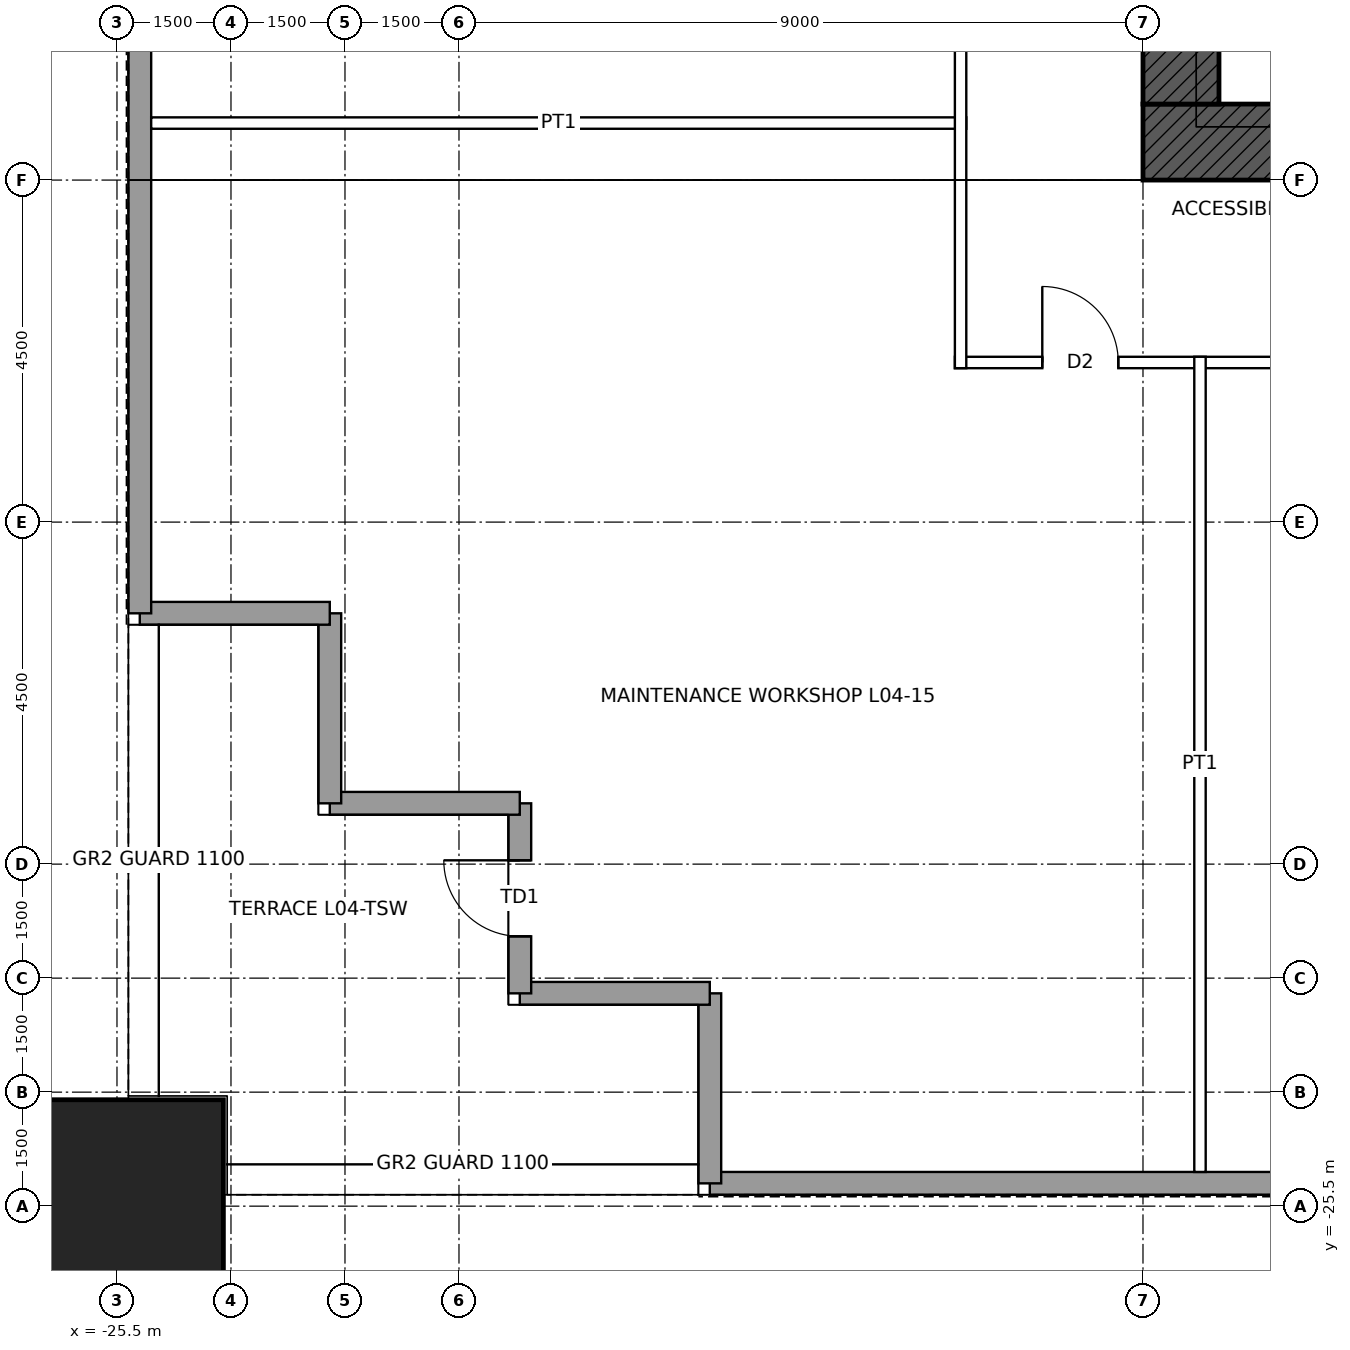
"""IFC4 building model, lengths in metres.
Left out: names, types, materials, properties, quantities, classifications, styles, units other than length and angle.
Written with IfcOpenShell. Run it as: python <this file> out.ifc"""

import sys

from ifc_helpers import new_model, si_unit, direction, frame, frame_2d, origin, origin_2d, place, context, subcontext, project, spatial, rectangle, hollow_rectangle, extrude, element, fill, save


model = new_model("IFC4")
c1 = context("Model", 3, precision=1e-05, world=origin(), true_north=direction((0.0, 1.0)))
c2 = subcontext(c1, "Body", "Model", "MODEL_VIEW")
j1 = project(units=[si_unit("LENGTHUNIT", "METRE"), si_unit("PLANEANGLEUNIT", "RADIAN")], contexts=[c1])
p1 = place(None, origin())
s1 = spatial("IfcSite", under=j1, at=p1, CompositionType="ELEMENT")
p2 = place(p1, origin())
s2 = spatial("IfcBuilding", under=s1, at=p2, CompositionType="ELEMENT")
p3 = place(p2, frame((0.0, 0.0, 23.4)))
s3 = spatial("IfcBuildingStorey", under=s2, at=p3, CompositionType="ELEMENT", Elevation=23.4)
p4 = place(p3, frame((-25.5, -25.5, 0.0), z_axis=(0.0, 0.0, 1.0), x_axis=(1.0, 0.0, 0.0)))
e1 = element("IfcColumn", 1, at=p4, inside=s3, PredefinedType="COLUMN", context=c2, shape_type="SweptSolid", body=[
    extrude(hollow_rectangle(XDim=2.8, YDim=2.8, WallThickness=0.14, at=origin_2d()), origin(), (0.0, 0.0, 1.0), 5.0),
])
p5 = place(p3, frame((12.0, -11.5, 0.0), z_axis=(0.0, 0.0, 1.0), x_axis=(-1.0, 0.0, 0.0)))
e2 = element("IfcWall", 2, at=p5, inside=s3, PredefinedType="SHEAR", context=c2, shape_type="SweptSolid", body=[
    extrude(rectangle(XDim=24.0, YDim=1.0, at=frame_2d((12.0, 0.0))), origin(), (0.0, 0.0, 1.0), 5.0),
])
p6 = place(p5, frame((11.5, 0.0, 0.0)))
e3 = element("IfcOpeningElement", 3, at=p6, cuts=e2, PredefinedType="OPENING", context=c2, shape_type="SweptSolid", body=[
    extrude(rectangle(XDim=1.0, YDim=2.1, at=frame_2d((0.5, 1.05))), frame((0.0, 0.51, 0.0), z_axis=(0.0, -1.0, 0.0), x_axis=(1.0, 0.0, 0.0)), (0.0, 0.0, 1.0), 1.02),
])
p7 = place(p5, frame((1.0, 0.0, 0.0)))
e4 = element("IfcOpeningElement", 4, at=p7, cuts=e2, PredefinedType="OPENING", context=c2, shape_type="SweptSolid", body=[
    extrude(rectangle(XDim=1.0, YDim=2.4, at=frame_2d((0.5, 1.2))), frame((0.0, 0.51, 0.0), z_axis=(0.0, -1.0, 0.0), x_axis=(1.0, 0.0, 0.0)), (0.0, 0.0, 1.0), 1.02),
])
p8 = place(p3, frame((-11.5, -11.0, 0.0), z_axis=(0.0, 0.0, 1.0), x_axis=(0.0, 1.0, 0.0)))
e5 = element("IfcWall", 5, at=p8, inside=s3, PredefinedType="SHEAR", context=c2, shape_type="SweptSolid", body=[
    extrude(rectangle(XDim=22.0, YDim=1.0, at=frame_2d((11.0, 0.0))), origin(), (0.0, 0.0, 1.0), 5.0),
])
p9 = place(p8, frame((10.5, 0.0, 0.0)))
e6 = element("IfcOpeningElement", 6, at=p9, cuts=e5, PredefinedType="OPENING", context=c2, shape_type="SweptSolid", body=[
    extrude(rectangle(XDim=1.0, YDim=2.4, at=frame_2d((0.5, 1.2))), frame((0.0, 0.51, 0.0), z_axis=(0.0, -1.0, 0.0), x_axis=(1.0, 0.0, 0.0)), (0.0, 0.0, 1.0), 1.02),
])
p10 = place(p3, frame((17.7, -25.2, 0.0), z_axis=(0.0, 0.0, 1.0), x_axis=(-1.0, 0.0, 0.0)))
e7 = element("IfcWall", 7, at=p10, inside=s3, PredefinedType="SOLIDWALL", context=c2, shape_type="SweptSolid", body=[
    extrude(rectangle(XDim=35.4, YDim=0.3, at=frame_2d((17.7, 0.0))), origin(), (0.0, 0.0, 1.0), 4.8),
])
for number, where, z_axis, x_axis in (
    (8, (-17.7, -25.2, 0.0), (0.0, 0.0, 1.0), (0.0, 1.0, 0.0)),
    (9, (-17.7, -22.7, 0.0), (0.0, 0.0, 1.0), (-1.0, 0.0, 0.0)),
):
    element("IfcWall", number, at=place(p3, frame(where, z_axis=z_axis, x_axis=x_axis)), inside=s3, PredefinedType="SOLIDWALL", context=c2, shape_type="SweptSolid", body=[
        extrude(rectangle(XDim=2.5, YDim=0.3, at=frame_2d((1.25, 0.0))), origin(), (0.0, 0.0, 1.0), 4.8),
    ])
p11 = place(p3, frame((-20.2, -22.7, 0.0), z_axis=(0.0, 0.0, 1.0), x_axis=(0.0, 1.0, 0.0)))
e10 = element("IfcWall", 10, at=p11, inside=s3, PredefinedType="SOLIDWALL", context=c2, shape_type="SweptSolid", body=[
    extrude(rectangle(XDim=2.5, YDim=0.3, at=frame_2d((1.25, 0.0))), origin(), (0.0, 0.0, 1.0), 4.8),
])
p12 = place(p11, frame((0.75, 0.0, 0.0)))
e11 = element("IfcOpeningElement", 11, at=p12, cuts=e10, PredefinedType="OPENING", context=c2, shape_type="SweptSolid", body=[
    extrude(rectangle(XDim=1.0, YDim=2.4, at=frame_2d((0.5, 1.2))), frame((0.0, 0.16, 0.0), z_axis=(0.0, -1.0, 0.0), x_axis=(1.0, 0.0, 0.0)), (0.0, 0.0, 1.0), 0.32),
])
for number, where, z_axis, x_axis in (
    (12, (-20.2, -20.2, 0.0), (0.0, 0.0, 1.0), (-1.0, 0.0, 0.0)),
    (13, (-22.7, -20.2, 0.0), (0.0, 0.0, 1.0), (0.0, 1.0, 0.0)),
    (14, (-22.7, -17.7, 0.0), (0.0, 0.0, 1.0), (-1.0, 0.0, 0.0)),
):
    element("IfcWall", number, at=place(p3, frame(where, z_axis=z_axis, x_axis=x_axis)), inside=s3, PredefinedType="SOLIDWALL", context=c2, shape_type="SweptSolid", body=[
        extrude(rectangle(XDim=2.5, YDim=0.3, at=frame_2d((1.25, 0.0))), origin(), (0.0, 0.0, 1.0), 4.8),
    ])
p13 = place(p3, frame((-25.2, -17.7, 0.0), z_axis=(0.0, 0.0, 1.0), x_axis=(0.0, 1.0, 0.0)))
e15 = element("IfcWall", 15, at=p13, inside=s3, PredefinedType="SOLIDWALL", context=c2, shape_type="SweptSolid", body=[
    extrude(rectangle(XDim=35.4, YDim=0.3, at=frame_2d((17.7, 0.0))), origin(), (0.0, 0.0, 1.0), 4.8),
])
p14 = place(p13, frame((13.45, 0.0, 0.0)))
e16 = element("IfcOpeningElement", 16, at=p14, cuts=e15, PredefinedType="OPENING", context=c2, shape_type="SweptSolid", body=[
    extrude(rectangle(XDim=1.0, YDim=2.1, at=frame_2d((0.5, 1.05))), frame((0.0, 0.16, 0.0), z_axis=(0.0, -1.0, 0.0), x_axis=(1.0, 0.0, 0.0)), (0.0, 0.0, 1.0), 0.32),
])
p15 = place(p3, frame((-14.475, -14.4, 0.0), z_axis=(0.0, 0.0, 1.0), x_axis=(1.0, 0.0, 0.0)))
e17 = element("IfcWall", 17, at=p15, inside=s3, PredefinedType="PARTITIONING", context=c2, shape_type="SweptSolid", body=[
    extrude(rectangle(XDim=28.95, YDim=0.15, at=frame_2d((14.475, 0.0))), origin(), (0.0, 0.0, 1.0), 4.8),
])
p16 = place(p15, frame((19.2, 0.0, 0.0)))
e18 = element("IfcOpeningElement", 18, at=p16, cuts=e17, PredefinedType="OPENING", context=c2, shape_type="SweptSolid", body=[
    extrude(rectangle(XDim=1.8, YDim=2.4, at=frame_2d((0.9, 1.2))), frame((0.0, 0.085, 0.0), z_axis=(0.0, -1.0, 0.0), x_axis=(1.0, 0.0, 0.0)), (0.0, 0.0, 1.0), 0.17),
])
p17 = place(p15, frame((11.7, 0.0, 0.0)))
e19 = element("IfcOpeningElement", 19, at=p17, cuts=e17, PredefinedType="OPENING", context=c2, shape_type="SweptSolid", body=[
    extrude(rectangle(XDim=1.8, YDim=2.4, at=frame_2d((0.9, 1.2))), frame((0.0, 0.085, 0.0), z_axis=(0.0, -1.0, 0.0), x_axis=(1.0, 0.0, 0.0)), (0.0, 0.0, 1.0), 0.17),
])
p18 = place(p15, frame((6.475, 0.0, 0.0)))
e20 = element("IfcOpeningElement", 20, at=p18, cuts=e17, PredefinedType="OPENING", context=c2, shape_type="SweptSolid", body=[
    extrude(rectangle(XDim=1.0, YDim=2.1, at=frame_2d((0.5, 1.05))), frame((0.0, 0.085, 0.0), z_axis=(0.0, -1.0, 0.0), x_axis=(1.0, 0.0, 0.0)), (0.0, 0.0, 1.0), 0.17),
])
p19 = place(p15, frame((26.8, 0.0, 0.0)))
e21 = element("IfcOpeningElement", 21, at=p19, cuts=e17, PredefinedType="OPENING", context=c2, shape_type="SweptSolid", body=[
    extrude(rectangle(XDim=1.0, YDim=2.1, at=frame_2d((0.5, 1.05))), frame((0.0, 0.085, 0.0), z_axis=(0.0, -1.0, 0.0), x_axis=(1.0, 0.0, 0.0)), (0.0, 0.0, 1.0), 0.17),
])
p20 = place(p15, frame((1.15, 0.0, 0.0)))
e22 = element("IfcOpeningElement", 22, at=p20, cuts=e17, PredefinedType="OPENING", context=c2, shape_type="SweptSolid", body=[
    extrude(rectangle(XDim=1.0, YDim=2.1, at=frame_2d((0.5, 1.05))), frame((0.0, 0.085, 0.0), z_axis=(0.0, -1.0, 0.0), x_axis=(1.0, 0.0, 0.0)), (0.0, 0.0, 1.0), 0.17),
])
p21 = place(p3, frame((-25.05, -11.25, 0.0), z_axis=(0.0, 0.0, 1.0), x_axis=(1.0, 0.0, 0.0)))
e23 = element("IfcWall", 23, at=p21, inside=s3, PredefinedType="PARTITIONING", context=c2, shape_type="SweptSolid", body=[
    extrude(rectangle(XDim=10.725, YDim=0.15, at=frame_2d((5.363, 0.0))), origin(), (0.0, 0.0, 1.0), 3.853),
])
p22 = place(p3, frame((-14.4, -14.475, 0.0), z_axis=(0.0, 0.0, 1.0), x_axis=(0.0, 1.0, 0.0)))
e24 = element("IfcWall", 24, at=p22, inside=s3, PredefinedType="PARTITIONING", context=c2, shape_type="SweptSolid", body=[
    extrude(rectangle(XDim=28.95, YDim=0.15, at=frame_2d((14.475, 0.0))), origin(), (0.0, 0.0, 1.0), 4.8),
])
p23 = place(p22, frame((9.825, 0.0, 0.0)))
e25 = element("IfcOpeningElement", 25, at=p23, cuts=e24, PredefinedType="OPENING", context=c2, shape_type="SweptSolid", body=[
    extrude(rectangle(XDim=1.8, YDim=2.4, at=frame_2d((0.9, 1.2))), frame((0.0, 0.085, 0.0), z_axis=(0.0, -1.0, 0.0), x_axis=(1.0, 0.0, 0.0)), (0.0, 0.0, 1.0), 0.17),
])
p24 = place(p22, frame((19.6, 0.0, 0.0)))
e26 = element("IfcOpeningElement", 26, at=p24, cuts=e24, PredefinedType="OPENING", context=c2, shape_type="SweptSolid", body=[
    extrude(rectangle(XDim=1.0, YDim=2.1, at=frame_2d((0.5, 1.05))), frame((0.0, 0.085, 0.0), z_axis=(0.0, -1.0, 0.0), x_axis=(1.0, 0.0, 0.0)), (0.0, 0.0, 1.0), 0.17),
])
p25 = place(p22, frame((22.95, 0.0, 0.0)))
e27 = element("IfcOpeningElement", 27, at=p25, cuts=e24, PredefinedType="OPENING", context=c2, shape_type="SweptSolid", body=[
    extrude(rectangle(XDim=1.8, YDim=2.4, at=frame_2d((0.9, 1.2))), frame((0.0, 0.085, 0.0), z_axis=(0.0, -1.0, 0.0), x_axis=(1.0, 0.0, 0.0)), (0.0, 0.0, 1.0), 0.17),
])
p26 = place(p3, frame((-11.25, -25.05, 0.0), z_axis=(0.0, 0.0, 1.0), x_axis=(0.0, 1.0, 0.0)))
e28 = element("IfcWall", 28, at=p26, inside=s3, PredefinedType="PARTITIONING", context=c2, shape_type="SweptSolid", body=[
    extrude(rectangle(XDim=10.725, YDim=0.15, at=frame_2d((5.363, 0.0))), origin(), (0.0, 0.0, 1.0), 3.853),
])
p27 = place(p12, origin())
e29 = element("IfcDoor", 29, at=p27, inside=s3, OperationType="SINGLE_SWING_RIGHT", PredefinedType="DOOR", context=c2, shape_type="SweptSolid", body=[
    extrude(rectangle(XDim=1.0, YDim=2.4, at=frame_2d((0.5, 1.2))), frame((0.0, 0.025, 0.0), z_axis=(0.0, -1.0, 0.0), x_axis=(1.0, 0.0, 0.0)), (0.0, 0.0, 1.0), 0.05),
])
fill(e11, e29)
p28 = place(p20, origin())
e30 = element("IfcDoor", 30, at=p28, inside=s3, OperationType="SINGLE_SWING_LEFT", PredefinedType="DOOR", context=c2, shape_type="SweptSolid", body=[
    extrude(rectangle(XDim=1.0, YDim=2.1, at=frame_2d((0.5, 1.05))), frame((0.0, 0.025, 0.0), z_axis=(0.0, -1.0, 0.0), x_axis=(1.0, 0.0, 0.0)), (0.0, 0.0, 1.0), 0.05),
])
fill(e22, e30)
save(model, sys.argv[1])
